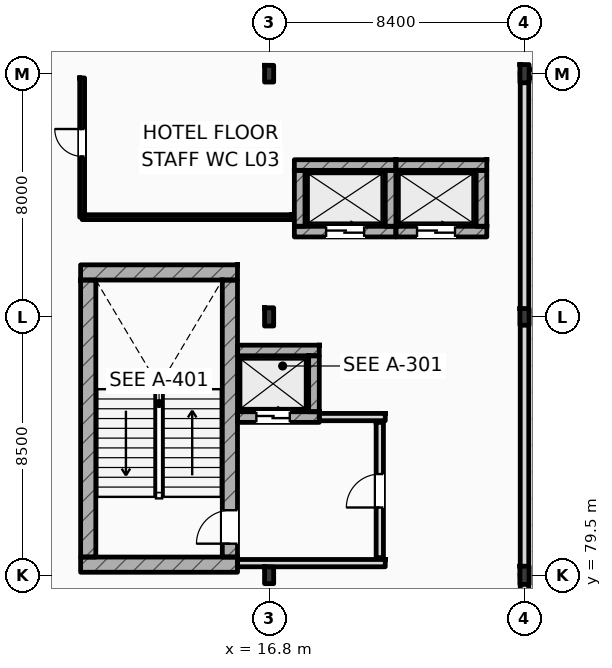
"""IFC4 building model, lengths in metres.
Left out: names, types, materials, properties, quantities, classifications, styles, units other than length and angle.
Written with IfcOpenShell. Run it as: python <this file> out.ifc"""

import sys

from ifc_helpers import new_model, si_unit, direction, frame, frame_2d, origin, origin_2d, place, context, subcontext, project, spatial, rectangle, i_section, extrude, element, fill, save


model = new_model("IFC4")
c1 = context("Model", 3, precision=1e-05, world=origin(), true_north=direction((0.0, 1.0)))
c2 = subcontext(c1, "Body", "Model", "MODEL_VIEW")
j1 = project(units=[si_unit("LENGTHUNIT", "METRE"), si_unit("PLANEANGLEUNIT", "RADIAN")], contexts=[c1])
p1 = place(None, origin())
s1 = spatial("IfcSite", under=j1, at=p1, CompositionType="ELEMENT")
p2 = place(p1, origin())
s2 = spatial("IfcBuilding", under=s1, at=p2, CompositionType="ELEMENT")
p3 = place(p2, frame((0.0, 0.0, 16.2)))
s3 = spatial("IfcBuildingStorey", under=s2, at=p3, CompositionType="ELEMENT", Elevation=16.2)
p4 = place(p3, frame((16.8, 79.5, 0.0), z_axis=(0.0, 0.0, 1.0), x_axis=(1.0, 0.0, 0.0)))
e1 = element("IfcColumn", 1, at=p4, inside=s3, PredefinedType="COLUMN", context=c2, shape_type="SweptSolid", body=[
    extrude(i_section(OverallWidth=0.3, OverallDepth=0.55, WebThickness=0.015, FlangeThickness=0.029, FilletRadius=0.027, at=origin_2d()), origin(), (0.0, 0.0, 1.0), 4.2),
])
p5 = place(p3, frame((16.8, 88.0, 0.0), z_axis=(0.0, 0.0, 1.0), x_axis=(1.0, 0.0, 0.0)))
e2 = element("IfcColumn", 2, at=p5, inside=s3, PredefinedType="COLUMN", context=c2, shape_type="SweptSolid", body=[
    extrude(i_section(OverallWidth=0.3, OverallDepth=0.6, WebThickness=0.015, FlangeThickness=0.03, FilletRadius=0.027, at=origin_2d()), origin(), (0.0, 0.0, 1.0), 4.2),
])
p6 = place(p3, frame((16.8, 96.0, 0.0), z_axis=(0.0, 0.0, 1.0), x_axis=(1.0, 0.0, 0.0)))
e3 = element("IfcColumn", 3, at=p6, inside=s3, PredefinedType="COLUMN", context=c2, shape_type="SweptSolid", body=[
    extrude(i_section(OverallWidth=0.3, OverallDepth=0.55, WebThickness=0.015, FlangeThickness=0.029, FilletRadius=0.027, at=origin_2d()), origin(), (0.0, 0.0, 1.0), 4.2),
])
p7 = place(p3, frame((25.2, 79.5, 0.0), z_axis=(0.0, 0.0, 1.0), x_axis=(1.0, 0.0, 0.0)))
e4 = element("IfcColumn", 4, at=p7, inside=s3, PredefinedType="COLUMN", context=c2, shape_type="SweptSolid", body=[
    extrude(i_section(OverallWidth=0.3, OverallDepth=0.6, WebThickness=0.015, FlangeThickness=0.03, FilletRadius=0.027, at=origin_2d()), origin(), (0.0, 0.0, 1.0), 4.2),
])
p8 = place(p3, frame((25.2, 88.0, 0.0), z_axis=(0.0, 0.0, 1.0), x_axis=(1.0, 0.0, 0.0)))
e5 = element("IfcColumn", 5, at=p8, inside=s3, PredefinedType="COLUMN", context=c2, shape_type="SweptSolid", body=[
    extrude(i_section(OverallWidth=0.3, OverallDepth=0.55, WebThickness=0.015, FlangeThickness=0.029, FilletRadius=0.027, at=origin_2d()), origin(), (0.0, 0.0, 1.0), 4.2),
])
p9 = place(p3, frame((25.2, 96.0, 0.0), z_axis=(0.0, 0.0, 1.0), x_axis=(1.0, 0.0, 0.0)))
e6 = element("IfcColumn", 6, at=p9, inside=s3, PredefinedType="COLUMN", context=c2, shape_type="SweptSolid", body=[
    extrude(i_section(OverallWidth=0.3, OverallDepth=0.6, WebThickness=0.015, FlangeThickness=0.03, FilletRadius=0.027, at=origin_2d()), origin(), (0.0, 0.0, 1.0), 4.2),
])
for number, where, z_axis, x_axis in (
    (7, (10.6, 89.462, 0.0), (0.0, 0.0, 1.0), (1.0, 0.0, 0.0)),
    (8, (10.6, 79.85, 0.0), (0.0, 0.0, 1.0), (1.0, 0.0, 0.0)),
):
    element("IfcWall", number, at=place(p3, frame(where, z_axis=z_axis, x_axis=x_axis)), inside=s3, PredefinedType="SHEAR", context=c2, shape_type="SweptSolid", body=[
        extrude(rectangle(XDim=5.16, YDim=0.5, at=frame_2d((2.58, 0.0))), origin(), (0.0, 0.0, 1.0), 4.2),
    ])
p10 = place(p3, frame((10.85, 80.1, 0.0), z_axis=(0.0, 0.0, 1.0), x_axis=(0.0, 1.0, 0.0)))
e9 = element("IfcWall", 9, at=p10, inside=s3, PredefinedType="SHEAR", context=c2, shape_type="SweptSolid", body=[
    extrude(rectangle(XDim=9.112, YDim=0.5, at=frame_2d((4.556, 0.0))), origin(), (0.0, 0.0, 1.0), 4.2),
])
p11 = place(p3, frame((15.51, 80.1, 0.0), z_axis=(0.0, 0.0, 1.0), x_axis=(0.0, 1.0, 0.0)))
e10 = element("IfcWall", 10, at=p11, inside=s3, PredefinedType="SHEAR", context=c2, shape_type="SweptSolid", body=[
    extrude(rectangle(XDim=9.112, YDim=0.5, at=frame_2d((4.556, 0.0))), origin(), (0.0, 0.0, 1.0), 4.2),
])
p12 = place(p11, frame((0.44, 0.0, 0.0)))
e11 = element("IfcOpeningElement", 11, at=p12, cuts=e10, PredefinedType="OPENING", context=c2, shape_type="SweptSolid", body=[
    extrude(rectangle(XDim=1.1, YDim=2.2, at=frame_2d((0.55, 1.1))), frame((0.0, 0.26, 0.0), z_axis=(0.0, -1.0, 0.0), x_axis=(1.0, 0.0, 0.0)), (0.0, 0.0, 1.0), 0.52),
])
p13 = place(p3, frame((25.2, 96.0, 0.0), z_axis=(0.0, 0.0, 1.0), x_axis=(1.0, 0.0, 0.0)))
e12 = element("IfcWall", 12, at=p13, inside=s3, PredefinedType="STANDARD", context=c2, shape_type="SweptSolid", body=[
    extrude(rectangle(XDim=23.4, YDim=0.28, at=frame_2d((11.7, 0.0))), origin(), (0.0, 0.0, 1.0), 3.46),
])
p14 = place(p3, frame((25.2, 62.5, 0.0), z_axis=(0.0, 0.0, 1.0), x_axis=(0.0, 1.0, 0.0)))
e13 = element("IfcWall", 13, at=p14, inside=s3, PredefinedType="STANDARD", context=c2, shape_type="SweptSolid", body=[
    extrude(rectangle(XDim=17.0, YDim=0.28, at=frame_2d((8.5, 0.0))), origin(), (0.0, 0.0, 1.0), 3.51),
])
p15 = place(p3, frame((25.2, 79.5, 0.0), z_axis=(0.0, 0.0, 1.0), x_axis=(0.0, 1.0, 0.0)))
e14 = element("IfcWall", 14, at=p15, inside=s3, PredefinedType="STANDARD", context=c2, shape_type="SweptSolid", body=[
    extrude(rectangle(XDim=16.5, YDim=0.28, at=frame_2d((8.25, 0.0))), origin(), (0.0, 0.0, 1.0), 3.51),
])
p16 = place(p3, frame((15.76, 86.895, 0.0), z_axis=(0.0, 0.0, 1.0), x_axis=(1.0, 0.0, 0.0)))
e15 = element("IfcWall", 15, at=p16, inside=s3, PredefinedType="SHEAR", context=c2, shape_type="SweptSolid", body=[
    extrude(rectangle(XDim=2.69, YDim=0.35, at=frame_2d((1.345, 0.0))), origin(), (0.0, 0.0, 1.0), 3.92),
])
p17 = place(p3, frame((15.76, 84.705, 0.0), z_axis=(0.0, 0.0, 1.0), x_axis=(1.0, 0.0, 0.0)))
e16 = element("IfcWall", 16, at=p17, inside=s3, PredefinedType="SHEAR", context=c2, shape_type="SweptSolid", body=[
    extrude(rectangle(XDim=2.69, YDim=0.35, at=frame_2d((1.345, 0.0))), origin(), (0.0, 0.0, 1.0), 3.92),
])
p18 = place(p17, frame((0.62, 0.0, 0.0)))
e17 = element("IfcOpeningElement", 17, at=p18, cuts=e16, PredefinedType="OPENING", context=c2, shape_type="SweptSolid", body=[
    extrude(rectangle(XDim=1.1, YDim=2.2, at=frame_2d((0.55, 1.1))), frame((0.0, 0.185, 0.0), z_axis=(0.0, -1.0, 0.0), x_axis=(1.0, 0.0, 0.0)), (0.0, 0.0, 1.0), 0.37),
])
p19 = place(p3, frame((18.275, 84.88, 0.0), z_axis=(0.0, 0.0, 1.0), x_axis=(0.0, 1.0, 0.0)))
e18 = element("IfcWall", 18, at=p19, inside=s3, PredefinedType="SHEAR", context=c2, shape_type="SweptSolid", body=[
    extrude(rectangle(XDim=1.84, YDim=0.35, at=frame_2d((0.92, 0.0))), origin(), (0.0, 0.0, 1.0), 3.92),
])
p20 = place(p3, frame((17.63, 92.995, 0.0), z_axis=(0.0, 0.0, 1.0), x_axis=(1.0, 0.0, 0.0)))
e19 = element("IfcWall", 19, at=p20, inside=s3, PredefinedType="SHEAR", context=c2, shape_type="SweptSolid", body=[
    extrude(rectangle(XDim=3.34, YDim=0.35, at=frame_2d((1.67, 0.0))), origin(), (0.0, 0.0, 1.0), 3.92),
])
p21 = place(p3, frame((17.63, 90.805, 0.0), z_axis=(0.0, 0.0, 1.0), x_axis=(1.0, 0.0, 0.0)))
e20 = element("IfcWall", 20, at=p21, inside=s3, PredefinedType="SHEAR", context=c2, shape_type="SweptSolid", body=[
    extrude(rectangle(XDim=3.34, YDim=0.35, at=frame_2d((1.67, 0.0))), origin(), (0.0, 0.0, 1.0), 3.92),
])
p22 = place(p21, frame((1.045, 0.0, 0.0)))
e21 = element("IfcOpeningElement", 21, at=p22, cuts=e20, PredefinedType="OPENING", context=c2, shape_type="SweptSolid", body=[
    extrude(rectangle(XDim=1.25, YDim=2.25, at=frame_2d((0.625, 1.125))), frame((0.0, 0.185, 0.0), z_axis=(0.0, -1.0, 0.0), x_axis=(1.0, 0.0, 0.0)), (0.0, 0.0, 1.0), 0.37),
])
for number, where, z_axis, x_axis in (
    (22, (17.805, 90.98, 0.0), (0.0, 0.0, 1.0), (0.0, 1.0, 0.0)),
    (23, (20.795, 90.98, 0.0), (0.0, 0.0, 1.0), (0.0, 1.0, 0.0)),
):
    element("IfcWall", number, at=place(p3, frame(where, z_axis=z_axis, x_axis=x_axis)), inside=s3, PredefinedType="SHEAR", context=c2, shape_type="SweptSolid", body=[
        extrude(rectangle(XDim=1.84, YDim=0.35, at=frame_2d((0.92, 0.0))), origin(), (0.0, 0.0, 1.0), 3.92),
    ])
p23 = place(p3, frame((20.97, 92.995, 0.0), z_axis=(0.0, 0.0, 1.0), x_axis=(1.0, 0.0, 0.0)))
e24 = element("IfcWall", 24, at=p23, inside=s3, PredefinedType="SHEAR", context=c2, shape_type="SweptSolid", body=[
    extrude(rectangle(XDim=2.99, YDim=0.35, at=frame_2d((1.495, 0.0))), origin(), (0.0, 0.0, 1.0), 3.92),
])
p24 = place(p3, frame((20.97, 90.805, 0.0), z_axis=(0.0, 0.0, 1.0), x_axis=(1.0, 0.0, 0.0)))
e25 = element("IfcWall", 25, at=p24, inside=s3, PredefinedType="SHEAR", context=c2, shape_type="SweptSolid", body=[
    extrude(rectangle(XDim=2.99, YDim=0.35, at=frame_2d((1.495, 0.0))), origin(), (0.0, 0.0, 1.0), 3.92),
])
p25 = place(p24, frame((0.695, 0.0, 0.0)))
e26 = element("IfcOpeningElement", 26, at=p25, cuts=e25, PredefinedType="OPENING", context=c2, shape_type="SweptSolid", body=[
    extrude(rectangle(XDim=1.25, YDim=2.25, at=frame_2d((0.625, 1.125))), frame((0.0, 0.185, 0.0), z_axis=(0.0, -1.0, 0.0), x_axis=(1.0, 0.0, 0.0)), (0.0, 0.0, 1.0), 0.37),
])
p26 = place(p3, frame((23.785, 90.98, 0.0), z_axis=(0.0, 0.0, 1.0), x_axis=(0.0, 1.0, 0.0)))
e27 = element("IfcWall", 27, at=p26, inside=s3, PredefinedType="SHEAR", context=c2, shape_type="SweptSolid", body=[
    extrude(rectangle(XDim=1.84, YDim=0.35, at=frame_2d((0.92, 0.0))), origin(), (0.0, 0.0, 1.0), 3.92),
])
p27 = place(p3, frame((15.76, 79.9, 0.0), z_axis=(0.0, 0.0, 1.0), x_axis=(1.0, 0.0, 0.0)))
e28 = element("IfcWall", 28, at=p27, inside=s3, PredefinedType="STANDARD", context=c2, shape_type="SweptSolid", body=[
    extrude(rectangle(XDim=4.86, YDim=0.24, at=frame_2d((2.43, 0.0))), origin(), (0.0, 0.0, 1.0), 3.92),
])
p28 = place(p3, frame((18.45, 84.705, 0.0), z_axis=(0.0, 0.0, 1.0), x_axis=(1.0, 0.0, 0.0)))
e29 = element("IfcWall", 29, at=p28, inside=s3, PredefinedType="STANDARD", context=c2, shape_type="SweptSolid", body=[
    extrude(rectangle(XDim=2.17, YDim=0.24, at=frame_2d((1.085, 0.0))), origin(), (0.0, 0.0, 1.0), 3.92),
])
p29 = place(p3, frame((20.44, 80.08, 0.0), z_axis=(0.0, 0.0, 1.0), x_axis=(0.0, 1.0, 0.0)))
e30 = element("IfcWall", 30, at=p29, inside=s3, PredefinedType="STANDARD", context=c2, shape_type="SweptSolid", body=[
    extrude(rectangle(XDim=4.45, YDim=0.24, at=frame_2d((2.225, 0.0))), origin(), (0.0, 0.0, 1.0), 3.92),
])
p30 = place(p29, frame((1.65, 0.0, 0.0)))
e31 = element("IfcOpeningElement", 31, at=p30, cuts=e30, PredefinedType="OPENING", context=c2, shape_type="SweptSolid", body=[
    extrude(rectangle(XDim=1.1, YDim=2.2, at=frame_2d((0.55, 1.1))), frame((0.0, 0.13, 0.0), z_axis=(0.0, -1.0, 0.0), x_axis=(1.0, 0.0, 0.0)), (0.0, 0.0, 1.0), 0.26),
])
p31 = place(p3, frame((10.65, 91.28, 0.0), z_axis=(0.0, 0.0, 1.0), x_axis=(0.0, 1.0, 0.0)))
e32 = element("IfcWall", 32, at=p31, inside=s3, PredefinedType="PARTITIONING", context=c2, shape_type="SweptSolid", body=[
    extrude(rectangle(XDim=4.58, YDim=0.16, at=frame_2d((2.29, 0.0))), origin(), (0.0, 0.0, 1.0), 3.92),
])
p32 = place(p31, frame((2.0, 0.0, 0.0)))
e33 = element("IfcOpeningElement", 33, at=p32, cuts=e32, PredefinedType="OPENING", context=c2, shape_type="SweptSolid", body=[
    extrude(rectangle(XDim=0.9, YDim=2.1, at=frame_2d((0.45, 1.05))), frame((0.0, 0.09, 0.0), z_axis=(0.0, -1.0, 0.0), x_axis=(1.0, 0.0, 0.0)), (0.0, 0.0, 1.0), 0.18),
])
p33 = place(p3, frame((10.65, 91.28, 0.0), z_axis=(0.0, 0.0, 1.0), x_axis=(1.0, 0.0, 0.0)))
e34 = element("IfcWall", 34, at=p33, inside=s3, PredefinedType="PARTITIONING", context=c2, shape_type="SweptSolid", body=[
    extrude(rectangle(XDim=6.9, YDim=0.16, at=frame_2d((3.45, 0.0))), origin(), (0.0, 0.0, 1.0), 3.92),
])
p34 = place(p12, origin())
e35 = element("IfcDoor", 35, at=p34, inside=s3, OperationType="SINGLE_SWING_LEFT", PredefinedType="DOOR", context=c2, shape_type="SweptSolid", body=[
    extrude(rectangle(XDim=1.1, YDim=2.2, at=frame_2d((0.55, 1.1))), frame((0.0, 0.025, 0.0), z_axis=(0.0, -1.0, 0.0), x_axis=(1.0, 0.0, 0.0)), (0.0, 0.0, 1.0), 0.05),
])
fill(e11, e35)
p35 = place(p18, origin())
e36 = element("IfcDoor", 36, at=p35, inside=s3, OperationType="SLIDING_TO_LEFT", PredefinedType="DOOR", context=c2, shape_type="SweptSolid", body=[
    extrude(rectangle(XDim=1.1, YDim=2.2, at=frame_2d((0.55, 1.1))), frame((0.0, 0.025, 0.0), z_axis=(0.0, -1.0, 0.0), x_axis=(1.0, 0.0, 0.0)), (0.0, 0.0, 1.0), 0.05),
])
fill(e17, e36)
p36 = place(p22, origin())
e37 = element("IfcDoor", 37, at=p36, inside=s3, OperationType="SLIDING_TO_LEFT", PredefinedType="DOOR", context=c2, shape_type="SweptSolid", body=[
    extrude(rectangle(XDim=1.25, YDim=2.25, at=frame_2d((0.625, 1.125))), frame((0.0, 0.025, 0.0), z_axis=(0.0, -1.0, 0.0), x_axis=(1.0, 0.0, 0.0)), (0.0, 0.0, 1.0), 0.05),
])
fill(e21, e37)
p37 = place(p25, origin())
e38 = element("IfcDoor", 38, at=p37, inside=s3, OperationType="SLIDING_TO_LEFT", PredefinedType="DOOR", context=c2, shape_type="SweptSolid", body=[
    extrude(rectangle(XDim=1.25, YDim=2.25, at=frame_2d((0.625, 1.125))), frame((0.0, 0.025, 0.0), z_axis=(0.0, -1.0, 0.0), x_axis=(1.0, 0.0, 0.0)), (0.0, 0.0, 1.0), 0.05),
])
fill(e26, e38)
p38 = place(p30, origin())
e39 = element("IfcDoor", 39, at=p38, inside=s3, OperationType="SINGLE_SWING_LEFT", PredefinedType="DOOR", context=c2, shape_type="SweptSolid", body=[
    extrude(rectangle(XDim=1.1, YDim=2.2, at=frame_2d((0.55, 1.1))), frame((0.0, 0.025, 0.0), z_axis=(0.0, -1.0, 0.0), x_axis=(1.0, 0.0, 0.0)), (0.0, 0.0, 1.0), 0.05),
])
fill(e31, e39)
p39 = place(p32, origin())
e40 = element("IfcDoor", 40, at=p39, inside=s3, OperationType="SINGLE_SWING_RIGHT", PredefinedType="DOOR", context=c2, shape_type="SweptSolid", body=[
    extrude(rectangle(XDim=0.9, YDim=2.1, at=frame_2d((0.45, 1.05))), frame((0.0, 0.025, 0.0), z_axis=(0.0, -1.0, 0.0), x_axis=(1.0, 0.0, 0.0)), (0.0, 0.0, 1.0), 0.05),
])
fill(e33, e40)
save(model, sys.argv[1])
